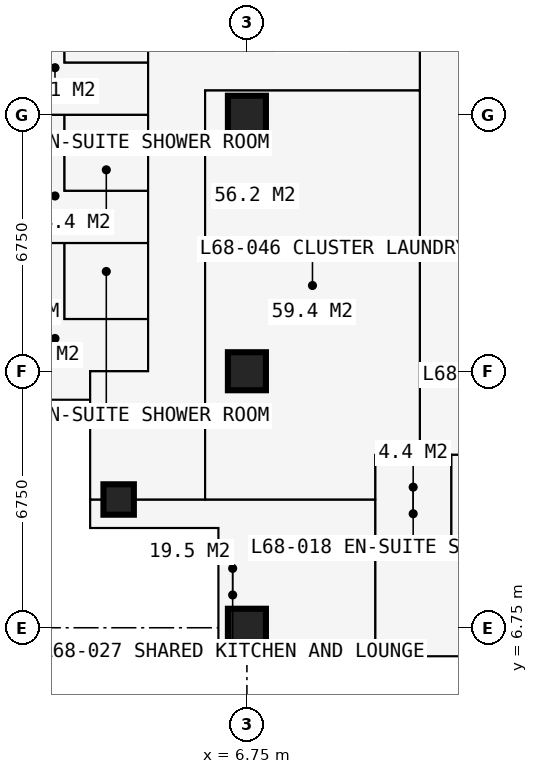
"""IFC4 building model, lengths in metres.
Left out: names, types, materials, properties, quantities, classifications, styles, units other than length and angle.
Written with IfcOpenShell. Run it as: python <this file> out.ifc"""

import sys

from ifc_helpers import new_model, si_unit, direction, frame, frame_2d, origin, origin_2d, place, context, subcontext, project, spatial, rectangle, extrude, element, fill, save


model = new_model("IFC4")
c1 = context("Model", 3, precision=1e-05, world=origin(), true_north=direction((0.0, 1.0)))
c2 = subcontext(c1, "Body", "Model", "MODEL_VIEW")
j1 = project(units=[si_unit("LENGTHUNIT", "METRE"), si_unit("PLANEANGLEUNIT", "RADIAN")], contexts=[c1])
p1 = place(None, origin())
s1 = spatial("IfcSite", under=j1, at=p1, CompositionType="ELEMENT")
p2 = place(p1, origin())
s2 = spatial("IfcBuilding", under=s1, at=p2, CompositionType="ELEMENT")
p3 = place(p2, frame((0.0, 0.0, 251.1)))
s3 = spatial("IfcBuildingStorey", under=s2, at=p3, CompositionType="ELEMENT", Elevation=251.1)
p4 = place(p3, frame((3.375, 10.125, 0.0), z_axis=(0.0, 0.0, 1.0), x_axis=(1.0, 0.0, 0.0)))
e1 = element("IfcColumn", 1, at=p4, inside=s3, PredefinedType="COLUMN", context=c2, shape_type="SweptSolid", body=[
    extrude(rectangle(XDim=0.8, YDim=0.8, at=origin_2d()), origin(), (0.0, 0.0, 1.0), 3.6),
])
for number, where, z_axis, x_axis in (
    (2, (6.75, 6.75, 0.0), (0.0, 0.0, 1.0), (1.0, 0.0, 0.0)),
    (3, (6.75, 13.5, 0.0), (0.0, 0.0, 1.0), (1.0, 0.0, 0.0)),
    (4, (6.75, 20.25, 0.0), (0.0, 0.0, 1.0), (1.0, 0.0, 0.0)),
):
    element("IfcColumn", number, at=place(p3, frame(where, z_axis=z_axis, x_axis=x_axis)), inside=s3, PredefinedType="COLUMN", context=c2, shape_type="SweptSolid", body=[
        extrude(rectangle(XDim=1.0, YDim=1.0, at=origin_2d()), origin(), (0.0, 0.0, 1.0), 3.6),
    ])
p5 = place(p3, frame((-0.75, 12.75, 0.0), z_axis=(0.0, 0.0, 1.0), x_axis=(1.0, 0.0, 0.0)))
e5 = element("IfcWall", 5, at=p5, inside=s3, PredefinedType="SOLIDWALL", context=c2, shape_type="SweptSolid", body=[
    extrude(rectangle(XDim=3.375, YDim=0.3, at=frame_2d((1.688, 0.0))), origin(), (0.0, 0.0, 1.0), 3.3),
])
p6 = place(p5, frame((0.788, 0.0, 0.6)))
e6 = element("IfcOpeningElement", 6, at=p6, cuts=e5, PredefinedType="OPENING", context=c2, shape_type="SweptSolid", body=[
    extrude(rectangle(XDim=1.8, YDim=2.1, at=frame_2d((0.9, 1.05))), frame((0.0, 0.16, 0.0), z_axis=(0.0, -1.0, 0.0), x_axis=(1.0, 0.0, 0.0)), (0.0, 0.0, 1.0), 0.32),
])
p7 = place(p3, frame((2.625, 12.75, 0.0), z_axis=(0.0, 0.0, 1.0), x_axis=(0.0, -1.0, 0.0)))
e7 = element("IfcWall", 7, at=p7, inside=s3, PredefinedType="SOLIDWALL", context=c2, shape_type="SweptSolid", body=[
    extrude(rectangle(XDim=3.375, YDim=0.3, at=frame_2d((1.688, 0.0))), origin(), (0.0, 0.0, 1.0), 3.3),
])
p8 = place(p7, frame((0.788, 0.0, 0.6)))
e8 = element("IfcOpeningElement", 8, at=p8, cuts=e7, PredefinedType="OPENING", context=c2, shape_type="SweptSolid", body=[
    extrude(rectangle(XDim=1.8, YDim=2.1, at=frame_2d((0.9, 1.05))), frame((0.0, 0.16, 0.0), z_axis=(0.0, -1.0, 0.0), x_axis=(1.0, 0.0, 0.0)), (0.0, 0.0, 1.0), 0.32),
])
p9 = place(p3, frame((2.625, 9.375, 0.0), z_axis=(0.0, 0.0, 1.0), x_axis=(1.0, 0.0, 0.0)))
e9 = element("IfcWall", 9, at=p9, inside=s3, PredefinedType="SOLIDWALL", context=c2, shape_type="SweptSolid", body=[
    extrude(rectangle(XDim=3.375, YDim=0.3, at=frame_2d((1.688, 0.0))), origin(), (0.0, 0.0, 1.0), 3.3),
])
p10 = place(p9, frame((0.788, 0.0, 0.6)))
e10 = element("IfcOpeningElement", 10, at=p10, cuts=e9, PredefinedType="OPENING", context=c2, shape_type="SweptSolid", body=[
    extrude(rectangle(XDim=1.8, YDim=2.1, at=frame_2d((0.9, 1.05))), frame((0.0, 0.16, 0.0), z_axis=(0.0, -1.0, 0.0), x_axis=(1.0, 0.0, 0.0)), (0.0, 0.0, 1.0), 0.32),
])
p11 = place(p3, frame((6.0, 9.375, 0.0), z_axis=(0.0, 0.0, 1.0), x_axis=(0.0, -1.0, 0.0)))
e11 = element("IfcWall", 11, at=p11, inside=s3, PredefinedType="SOLIDWALL", context=c2, shape_type="SweptSolid", body=[
    extrude(rectangle(XDim=3.375, YDim=0.3, at=frame_2d((1.688, 0.0))), origin(), (0.0, 0.0, 1.0), 3.3),
])
p12 = place(p11, frame((0.788, 0.0, 0.6)))
e12 = element("IfcOpeningElement", 12, at=p12, cuts=e11, PredefinedType="OPENING", context=c2, shape_type="SweptSolid", body=[
    extrude(rectangle(XDim=1.8, YDim=2.1, at=frame_2d((0.9, 1.05))), frame((0.0, 0.16, 0.0), z_axis=(0.0, -1.0, 0.0), x_axis=(1.0, 0.0, 0.0)), (0.0, 0.0, 1.0), 0.32),
])
p13 = place(p3, frame((-0.734, 16.875, 0.0), z_axis=(0.0, 0.0, 1.0), x_axis=(1.0, 0.0, 0.0)))
e13 = element("IfcWall", 13, at=p13, inside=s3, PredefinedType="PARTITIONING", context=c2, shape_type="SweptSolid", body=[
    extrude(rectangle(XDim=4.884, YDim=0.175, at=frame_2d((2.442, 0.0))), origin(), (0.0, 0.0, 1.0), 3.3),
])
p14 = place(p3, frame((-0.734, 20.25, 0.0), z_axis=(0.0, 0.0, 1.0), x_axis=(1.0, 0.0, 0.0)))
e14 = element("IfcWall", 14, at=p14, inside=s3, PredefinedType="PARTITIONING", context=c2, shape_type="SweptSolid", body=[
    extrude(rectangle(XDim=4.884, YDim=0.175, at=frame_2d((2.442, 0.0))), origin(), (0.0, 0.0, 1.0), 2.802),
])
p15 = place(p3, frame((1.95, 14.875, 0.0), z_axis=(0.0, 0.0, 1.0), x_axis=(0.0, 1.0, 0.0)))
e15 = element("IfcWall", 15, at=p15, inside=s3, PredefinedType="PARTITIONING", context=c2, shape_type="SweptSolid", body=[
    extrude(rectangle(XDim=2.0, YDim=0.1, at=frame_2d((1.0, 0.0))), origin(), (0.0, 0.0, 1.0), 3.3),
])
p16 = place(p3, frame((1.95, 14.875, 0.0), z_axis=(0.0, 0.0, 1.0), x_axis=(1.0, 0.0, 0.0)))
e16 = element("IfcWall", 16, at=p16, inside=s3, PredefinedType="PARTITIONING", context=c2, shape_type="SweptSolid", body=[
    extrude(rectangle(XDim=2.2, YDim=0.1, at=frame_2d((1.1, 0.0))), origin(), (0.0, 0.0, 1.0), 3.3),
])
p17 = place(p16, frame((0.65, 0.0, 0.0)))
e17 = element("IfcOpeningElement", 17, at=p17, cuts=e16, PredefinedType="OPENING", context=c2, shape_type="SweptSolid", body=[
    extrude(rectangle(XDim=0.9, YDim=2.2, at=frame_2d((0.45, 1.1))), frame((0.0, 0.06, 0.0), z_axis=(0.0, -1.0, 0.0), x_axis=(1.0, 0.0, 0.0)), (0.0, 0.0, 1.0), 0.12),
])
p18 = place(p3, frame((1.95, 18.25, 0.0), z_axis=(0.0, 0.0, 1.0), x_axis=(0.0, 1.0, 0.0)))
e18 = element("IfcWall", 18, at=p18, inside=s3, PredefinedType="PARTITIONING", context=c2, shape_type="SweptSolid", body=[
    extrude(rectangle(XDim=2.0, YDim=0.1, at=frame_2d((1.0, 0.0))), origin(), (0.0, 0.0, 1.0), 3.3),
])
p19 = place(p3, frame((1.95, 18.25, 0.0), z_axis=(0.0, 0.0, 1.0), x_axis=(1.0, 0.0, 0.0)))
e19 = element("IfcWall", 19, at=p19, inside=s3, PredefinedType="PARTITIONING", context=c2, shape_type="SweptSolid", body=[
    extrude(rectangle(XDim=2.2, YDim=0.1, at=frame_2d((1.1, 0.0))), origin(), (0.0, 0.0, 1.0), 3.3),
])
p20 = place(p19, frame((0.65, 0.0, 0.0)))
e20 = element("IfcOpeningElement", 20, at=p20, cuts=e19, PredefinedType="OPENING", context=c2, shape_type="SweptSolid", body=[
    extrude(rectangle(XDim=0.9, YDim=2.2, at=frame_2d((0.45, 1.1))), frame((0.0, 0.06, 0.0), z_axis=(0.0, -1.0, 0.0), x_axis=(1.0, 0.0, 0.0)), (0.0, 0.0, 1.0), 0.12),
])
p21 = place(p3, frame((1.95, 21.625, 0.0), z_axis=(0.0, 0.0, 1.0), x_axis=(0.0, 1.0, 0.0)))
e21 = element("IfcWall", 21, at=p21, inside=s3, PredefinedType="PARTITIONING", context=c2, shape_type="SweptSolid", body=[
    extrude(rectangle(XDim=2.0, YDim=0.1, at=frame_2d((1.0, 0.0))), origin(), (0.0, 0.0, 1.0), 3.3),
])
p22 = place(p3, frame((1.95, 21.625, 0.0), z_axis=(0.0, 0.0, 1.0), x_axis=(1.0, 0.0, 0.0)))
e22 = element("IfcWall", 22, at=p22, inside=s3, PredefinedType="PARTITIONING", context=c2, shape_type="SweptSolid", body=[
    extrude(rectangle(XDim=2.2, YDim=0.1, at=frame_2d((1.1, 0.0))), origin(), (0.0, 0.0, 1.0), 3.3),
])
p23 = place(p22, frame((0.65, 0.0, 0.0)))
e23 = element("IfcOpeningElement", 23, at=p23, cuts=e22, PredefinedType="OPENING", context=c2, shape_type="SweptSolid", body=[
    extrude(rectangle(XDim=0.9, YDim=2.2, at=frame_2d((0.45, 1.1))), frame((0.0, 0.06, 0.0), z_axis=(0.0, -1.0, 0.0), x_axis=(1.0, 0.0, 0.0)), (0.0, 0.0, 1.0), 0.12),
])
p24 = place(p3, frame((2.625, 12.766, 0.0), z_axis=(0.0, 0.0, 1.0), x_axis=(0.0, 1.0, 0.0)))
e24 = element("IfcWall", 24, at=p24, inside=s3, PredefinedType="PARTITIONING", context=c2, shape_type="SweptSolid", body=[
    extrude(rectangle(XDim=0.734, YDim=0.15, at=frame_2d((0.367, 0.0))), origin(), (0.0, 0.0, 1.0), 3.3),
])
p25 = place(p3, frame((2.625, 13.5, 0.0), z_axis=(0.0, 0.0, 1.0), x_axis=(1.0, 0.0, 0.0)))
e25 = element("IfcWall", 25, at=p25, inside=s3, PredefinedType="PARTITIONING", context=c2, shape_type="SweptSolid", body=[
    extrude(rectangle(XDim=1.525, YDim=0.15, at=frame_2d((0.762, 0.0))), origin(), (0.0, 0.0, 1.0), 2.802),
])
p26 = place(p25, frame((0.3, 0.0, 0.0)))
e26 = element("IfcOpeningElement", 26, at=p26, cuts=e25, PredefinedType="OPENING", context=c2, shape_type="SweptSolid", body=[
    extrude(rectangle(XDim=0.95, YDim=2.2, at=frame_2d((0.475, 1.1))), frame((0.0, 0.085, 0.0), z_axis=(0.0, -1.0, 0.0), x_axis=(1.0, 0.0, 0.0)), (0.0, 0.0, 1.0), 0.17),
])
p27 = place(p3, frame((2.775, 10.125, 0.0), z_axis=(0.0, 0.0, 1.0), x_axis=(1.0, 0.0, 0.0)))
e27 = element("IfcWall", 27, at=p27, inside=s3, PredefinedType="PARTITIONING", context=c2, shape_type="SweptSolid", body=[
    extrude(rectangle(XDim=7.35, YDim=0.15, at=frame_2d((3.675, 0.0))), origin(), (0.0, 0.0, 1.0), 2.802),
])
p28 = place(p27, frame((1.016, 0.0, 0.0)))
e28 = element("IfcOpeningElement", 28, at=p28, cuts=e27, PredefinedType="OPENING", context=c2, shape_type="SweptSolid", body=[
    extrude(rectangle(XDim=1.0, YDim=2.2, at=frame_2d((0.5, 1.1))), frame((0.0, 0.085, 0.0), z_axis=(0.0, -1.0, 0.0), x_axis=(1.0, 0.0, 0.0)), (0.0, 0.0, 1.0), 0.17),
])
p29 = place(p3, frame((4.15, 13.5, 0.0), z_axis=(0.0, 0.0, 1.0), x_axis=(0.0, 1.0, 0.0)))
e29 = element("IfcWall", 29, at=p29, inside=s3, PredefinedType="PARTITIONING", context=c2, shape_type="SweptSolid", body=[
    extrude(rectangle(XDim=13.5, YDim=0.15, at=frame_2d((6.75, 0.0))), origin(), (0.0, 0.0, 1.0), 3.3),
])
p30 = place(p29, frame((3.625, 0.0, 0.0)))
e30 = element("IfcOpeningElement", 30, at=p30, cuts=e29, PredefinedType="OPENING", context=c2, shape_type="SweptSolid", body=[
    extrude(rectangle(XDim=0.95, YDim=2.2, at=frame_2d((0.475, 1.1))), frame((0.0, 0.085, 0.0), z_axis=(0.0, -1.0, 0.0), x_axis=(1.0, 0.0, 0.0)), (0.0, 0.0, 1.0), 0.17),
])
p31 = place(p29, frame((7.0, 0.0, 0.0)))
e31 = element("IfcOpeningElement", 31, at=p31, cuts=e29, PredefinedType="OPENING", context=c2, shape_type="SweptSolid", body=[
    extrude(rectangle(XDim=0.95, YDim=2.2, at=frame_2d((0.475, 1.1))), frame((0.0, 0.085, 0.0), z_axis=(0.0, -1.0, 0.0), x_axis=(1.0, 0.0, 0.0)), (0.0, 0.0, 1.0), 0.17),
])
p32 = place(p29, frame((10.375, 0.0, 0.0)))
e32 = element("IfcOpeningElement", 32, at=p32, cuts=e29, PredefinedType="OPENING", context=c2, shape_type="SweptSolid", body=[
    extrude(rectangle(XDim=0.95, YDim=2.2, at=frame_2d((0.475, 1.1))), frame((0.0, 0.085, 0.0), z_axis=(0.0, -1.0, 0.0), x_axis=(1.0, 0.0, 0.0)), (0.0, 0.0, 1.0), 0.17),
])
p33 = place(p3, frame((5.65, 10.125, 0.0), z_axis=(0.0, 0.0, 1.0), x_axis=(0.0, 1.0, 0.0)))
e33 = element("IfcWall", 33, at=p33, inside=s3, PredefinedType="PARTITIONING", context=c2, shape_type="SweptSolid", body=[
    extrude(rectangle(XDim=10.762, YDim=0.15, at=frame_2d((5.381, 0.0))), origin(), (0.0, 0.0, 1.0), 3.3),
])
p34 = place(p33, frame((4.9, 0.0, 0.0)))
e34 = element("IfcOpeningElement", 34, at=p34, cuts=e33, PredefinedType="OPENING", context=c2, shape_type="SweptSolid", body=[
    extrude(rectangle(XDim=0.95, YDim=2.2, at=frame_2d((0.475, 1.1))), frame((0.0, 0.085, 0.0), z_axis=(0.0, -1.0, 0.0), x_axis=(1.0, 0.0, 0.0)), (0.0, 0.0, 1.0), 0.17),
])
p35 = place(p3, frame((5.65, 20.887, 0.0), z_axis=(0.0, 0.0, 1.0), x_axis=(1.0, 0.0, 0.0)))
e35 = element("IfcWall", 35, at=p35, inside=s3, PredefinedType="PARTITIONING", context=c2, shape_type="SweptSolid", body=[
    extrude(rectangle(XDim=5.65, YDim=0.15, at=frame_2d((2.825, 0.0))), origin(), (0.0, 0.0, 1.0), 3.3),
])
p36 = place(p3, frame((10.125, 6.016, 0.0), z_axis=(0.0, 0.0, 1.0), x_axis=(0.0, 1.0, 0.0)))
e36 = element("IfcWall", 36, at=p36, inside=s3, PredefinedType="PARTITIONING", context=c2, shape_type="SweptSolid", body=[
    extrude(rectangle(XDim=5.284, YDim=0.15, at=frame_2d((2.642, 0.0))), origin(), (0.0, 0.0, 1.0), 3.3),
])
p37 = place(p36, frame((1.05, 0.0, 0.0)))
e37 = element("IfcOpeningElement", 37, at=p37, cuts=e36, PredefinedType="OPENING", context=c2, shape_type="SweptSolid", body=[
    extrude(rectangle(XDim=0.95, YDim=2.2, at=frame_2d((0.475, 1.1))), frame((0.0, 0.085, 0.0), z_axis=(0.0, -1.0, 0.0), x_axis=(1.0, 0.0, 0.0)), (0.0, 0.0, 1.0), 0.17),
])
p38 = place(p3, frame((10.125, 9.1, 0.0), z_axis=(0.0, 0.0, 1.0), x_axis=(1.0, 0.0, 0.0)))
e38 = element("IfcWall", 38, at=p38, inside=s3, PredefinedType="PARTITIONING", context=c2, shape_type="SweptSolid", body=[
    extrude(rectangle(XDim=2.0, YDim=0.1, at=frame_2d((1.0, 0.0))), origin(), (0.0, 0.0, 1.0), 3.3),
])
p39 = place(p3, frame((10.125, 11.3, 0.0), z_axis=(0.0, 0.0, 1.0), x_axis=(1.0, 0.0, 0.0)))
e39 = element("IfcWall", 39, at=p39, inside=s3, PredefinedType="PARTITIONING", context=c2, shape_type="SweptSolid", body=[
    extrude(rectangle(XDim=20.984, YDim=0.15, at=frame_2d((10.492, 0.0))), origin(), (0.0, 0.0, 1.0), 3.3),
])
p40 = place(p39, frame((3.625, 0.0, 0.0)))
e40 = element("IfcOpeningElement", 40, at=p40, cuts=e39, PredefinedType="OPENING", context=c2, shape_type="SweptSolid", body=[
    extrude(rectangle(XDim=0.95, YDim=2.2, at=frame_2d((0.475, 1.1))), frame((0.0, 0.085, 0.0), z_axis=(0.0, -1.0, 0.0), x_axis=(1.0, 0.0, 0.0)), (0.0, 0.0, 1.0), 0.17),
])
p41 = place(p39, frame((7.0, 0.0, 0.0)))
e41 = element("IfcOpeningElement", 41, at=p41, cuts=e39, PredefinedType="OPENING", context=c2, shape_type="SweptSolid", body=[
    extrude(rectangle(XDim=0.95, YDim=2.2, at=frame_2d((0.475, 1.1))), frame((0.0, 0.085, 0.0), z_axis=(0.0, -1.0, 0.0), x_axis=(1.0, 0.0, 0.0)), (0.0, 0.0, 1.0), 0.17),
])
p42 = place(p39, frame((10.375, 0.0, 0.0)))
e42 = element("IfcOpeningElement", 42, at=p42, cuts=e39, PredefinedType="OPENING", context=c2, shape_type="SweptSolid", body=[
    extrude(rectangle(XDim=0.95, YDim=2.2, at=frame_2d((0.475, 1.1))), frame((0.0, 0.085, 0.0), z_axis=(0.0, -1.0, 0.0), x_axis=(1.0, 0.0, 0.0)), (0.0, 0.0, 1.0), 0.17),
])
p43 = place(p39, frame((13.75, 0.0, 0.0)))
e43 = element("IfcOpeningElement", 43, at=p43, cuts=e39, PredefinedType="OPENING", context=c2, shape_type="SweptSolid", body=[
    extrude(rectangle(XDim=0.95, YDim=2.2, at=frame_2d((0.475, 1.1))), frame((0.0, 0.085, 0.0), z_axis=(0.0, -1.0, 0.0), x_axis=(1.0, 0.0, 0.0)), (0.0, 0.0, 1.0), 0.17),
])
p44 = place(p39, frame((17.475, 0.0, 0.0)))
e44 = element("IfcOpeningElement", 44, at=p44, cuts=e39, PredefinedType="OPENING", context=c2, shape_type="SweptSolid", body=[
    extrude(rectangle(XDim=1.0, YDim=2.2, at=frame_2d((0.5, 1.1))), frame((0.0, 0.085, 0.0), z_axis=(0.0, -1.0, 0.0), x_axis=(1.0, 0.0, 0.0)), (0.0, 0.0, 1.0), 0.17),
])
p45 = place(p3, frame((11.3, 11.3, 0.0), z_axis=(0.0, 0.0, 1.0), x_axis=(0.0, 1.0, 0.0)))
e45 = element("IfcWall", 45, at=p45, inside=s3, PredefinedType="PARTITIONING", context=c2, shape_type="SweptSolid", body=[
    extrude(rectangle(XDim=19.075, YDim=0.15, at=frame_2d((9.538, 0.0))), origin(), (0.0, 0.0, 1.0), 3.3),
])
p46 = place(p45, frame((13.95, 0.0, 0.0)))
e46 = element("IfcOpeningElement", 46, at=p46, cuts=e45, PredefinedType="OPENING", context=c2, shape_type="SweptSolid", body=[
    extrude(rectangle(XDim=1.0, YDim=2.2, at=frame_2d((0.5, 1.1))), frame((0.0, 0.085, 0.0), z_axis=(0.0, -1.0, 0.0), x_axis=(1.0, 0.0, 0.0)), (0.0, 0.0, 1.0), 0.17),
])
p47 = place(p3, frame((12.125, 9.1, 0.0), z_axis=(0.0, 0.0, 1.0), x_axis=(0.0, 1.0, 0.0)))
e47 = element("IfcWall", 47, at=p47, inside=s3, PredefinedType="PARTITIONING", context=c2, shape_type="SweptSolid", body=[
    extrude(rectangle(XDim=2.2, YDim=0.1, at=frame_2d((1.1, 0.0))), origin(), (0.0, 0.0, 1.0), 3.3),
])
p48 = place(p47, frame((0.65, 0.0, 0.0)))
e48 = element("IfcOpeningElement", 48, at=p48, cuts=e47, PredefinedType="OPENING", context=c2, shape_type="SweptSolid", body=[
    extrude(rectangle(XDim=0.9, YDim=2.2, at=frame_2d((0.45, 1.1))), frame((0.0, 0.06, 0.0), z_axis=(0.0, -1.0, 0.0), x_axis=(1.0, 0.0, 0.0)), (0.0, 0.0, 1.0), 0.12),
])
p49 = place(p6, origin())
e49 = element("IfcWindow", 49, at=p49, inside=s3, PartitioningType="SINGLE_PANEL", PredefinedType="WINDOW", context=c2, shape_type="SweptSolid", body=[
    extrude(rectangle(XDim=1.8, YDim=2.1, at=frame_2d((0.9, 1.05))), frame((0.0, 0.03, 0.0), z_axis=(0.0, -1.0, 0.0), x_axis=(1.0, 0.0, 0.0)), (0.0, 0.0, 1.0), 0.06),
])
fill(e6, e49)
p50 = place(p8, origin())
e50 = element("IfcWindow", 50, at=p50, inside=s3, PartitioningType="SINGLE_PANEL", PredefinedType="WINDOW", context=c2, shape_type="SweptSolid", body=[
    extrude(rectangle(XDim=1.8, YDim=2.1, at=frame_2d((0.9, 1.05))), frame((0.0, 0.03, 0.0), z_axis=(0.0, -1.0, 0.0), x_axis=(1.0, 0.0, 0.0)), (0.0, 0.0, 1.0), 0.06),
])
fill(e8, e50)
p51 = place(p10, origin())
e51 = element("IfcWindow", 51, at=p51, inside=s3, PartitioningType="SINGLE_PANEL", PredefinedType="WINDOW", context=c2, shape_type="SweptSolid", body=[
    extrude(rectangle(XDim=1.8, YDim=2.1, at=frame_2d((0.9, 1.05))), frame((0.0, 0.03, 0.0), z_axis=(0.0, -1.0, 0.0), x_axis=(1.0, 0.0, 0.0)), (0.0, 0.0, 1.0), 0.06),
])
fill(e10, e51)
p52 = place(p12, origin())
e52 = element("IfcWindow", 52, at=p52, inside=s3, PartitioningType="SINGLE_PANEL", PredefinedType="WINDOW", context=c2, shape_type="SweptSolid", body=[
    extrude(rectangle(XDim=1.8, YDim=2.1, at=frame_2d((0.9, 1.05))), frame((0.0, 0.03, 0.0), z_axis=(0.0, -1.0, 0.0), x_axis=(1.0, 0.0, 0.0)), (0.0, 0.0, 1.0), 0.06),
])
fill(e12, e52)
p53 = place(p37, origin())
e53 = element("IfcDoor", 53, at=p53, inside=s3, OperationType="SINGLE_SWING_LEFT", PredefinedType="DOOR", context=c2, shape_type="SweptSolid", body=[
    extrude(rectangle(XDim=0.95, YDim=2.2, at=frame_2d((0.475, 1.1))), frame((0.0, 0.025, 0.0), z_axis=(0.0, -1.0, 0.0), x_axis=(1.0, 0.0, 0.0)), (0.0, 0.0, 1.0), 0.05),
])
fill(e37, e53)
p54 = place(p48, origin())
e54 = element("IfcDoor", 54, at=p54, inside=s3, OperationType="SINGLE_SWING_RIGHT", PredefinedType="DOOR", context=c2, shape_type="SweptSolid", body=[
    extrude(rectangle(XDim=0.9, YDim=2.2, at=frame_2d((0.45, 1.1))), frame((0.0, 0.025, 0.0), z_axis=(0.0, -1.0, 0.0), x_axis=(1.0, 0.0, 0.0)), (0.0, 0.0, 1.0), 0.05),
])
fill(e48, e54)
p55 = place(p28, origin())
e55 = element("IfcDoor", 55, at=p55, inside=s3, OperationType="SINGLE_SWING_LEFT", PredefinedType="DOOR", context=c2, shape_type="SweptSolid", body=[
    extrude(rectangle(XDim=1.0, YDim=2.2, at=frame_2d((0.5, 1.1))), frame((0.0, 0.025, 0.0), z_axis=(0.0, -1.0, 0.0), x_axis=(1.0, 0.0, 0.0)), (0.0, 0.0, 1.0), 0.05),
])
fill(e28, e55)
p56 = place(p26, origin())
e56 = element("IfcDoor", 56, at=p56, inside=s3, OperationType="SINGLE_SWING_LEFT", PredefinedType="DOOR", context=c2, shape_type="SweptSolid", body=[
    extrude(rectangle(XDim=0.95, YDim=2.2, at=frame_2d((0.475, 1.1))), frame((0.0, 0.025, 0.0), z_axis=(0.0, -1.0, 0.0), x_axis=(1.0, 0.0, 0.0)), (0.0, 0.0, 1.0), 0.05),
])
fill(e26, e56)
p57 = place(p17, origin())
e57 = element("IfcDoor", 57, at=p57, inside=s3, OperationType="SINGLE_SWING_RIGHT", PredefinedType="DOOR", context=c2, shape_type="SweptSolid", body=[
    extrude(rectangle(XDim=0.9, YDim=2.2, at=frame_2d((0.45, 1.1))), frame((0.0, 0.025, 0.0), z_axis=(0.0, -1.0, 0.0), x_axis=(1.0, 0.0, 0.0)), (0.0, 0.0, 1.0), 0.05),
])
fill(e17, e57)
p58 = place(p30, origin())
e58 = element("IfcDoor", 58, at=p58, inside=s3, OperationType="SINGLE_SWING_LEFT", PredefinedType="DOOR", context=c2, shape_type="SweptSolid", body=[
    extrude(rectangle(XDim=0.95, YDim=2.2, at=frame_2d((0.475, 1.1))), frame((0.0, 0.025, 0.0), z_axis=(0.0, -1.0, 0.0), x_axis=(1.0, 0.0, 0.0)), (0.0, 0.0, 1.0), 0.05),
])
fill(e30, e58)
p59 = place(p20, origin())
e59 = element("IfcDoor", 59, at=p59, inside=s3, OperationType="SINGLE_SWING_RIGHT", PredefinedType="DOOR", context=c2, shape_type="SweptSolid", body=[
    extrude(rectangle(XDim=0.9, YDim=2.2, at=frame_2d((0.45, 1.1))), frame((0.0, 0.025, 0.0), z_axis=(0.0, -1.0, 0.0), x_axis=(1.0, 0.0, 0.0)), (0.0, 0.0, 1.0), 0.05),
])
fill(e20, e59)
p60 = place(p31, origin())
e60 = element("IfcDoor", 60, at=p60, inside=s3, OperationType="SINGLE_SWING_LEFT", PredefinedType="DOOR", context=c2, shape_type="SweptSolid", body=[
    extrude(rectangle(XDim=0.95, YDim=2.2, at=frame_2d((0.475, 1.1))), frame((0.0, 0.025, 0.0), z_axis=(0.0, -1.0, 0.0), x_axis=(1.0, 0.0, 0.0)), (0.0, 0.0, 1.0), 0.05),
])
fill(e31, e60)
p61 = place(p23, origin())
e61 = element("IfcDoor", 61, at=p61, inside=s3, OperationType="SINGLE_SWING_RIGHT", PredefinedType="DOOR", context=c2, shape_type="SweptSolid", body=[
    extrude(rectangle(XDim=0.9, YDim=2.2, at=frame_2d((0.45, 1.1))), frame((0.0, 0.025, 0.0), z_axis=(0.0, -1.0, 0.0), x_axis=(1.0, 0.0, 0.0)), (0.0, 0.0, 1.0), 0.05),
])
fill(e23, e61)
p62 = place(p34, origin())
e62 = element("IfcDoor", 62, at=p62, inside=s3, OperationType="SINGLE_SWING_LEFT", PredefinedType="DOOR", context=c2, shape_type="SweptSolid", body=[
    extrude(rectangle(XDim=0.95, YDim=2.2, at=frame_2d((0.475, 1.1))), frame((0.0, 0.025, 0.0), z_axis=(0.0, -1.0, 0.0), x_axis=(1.0, 0.0, 0.0)), (0.0, 0.0, 1.0), 0.05),
])
fill(e34, e62)
save(model, sys.argv[1])
